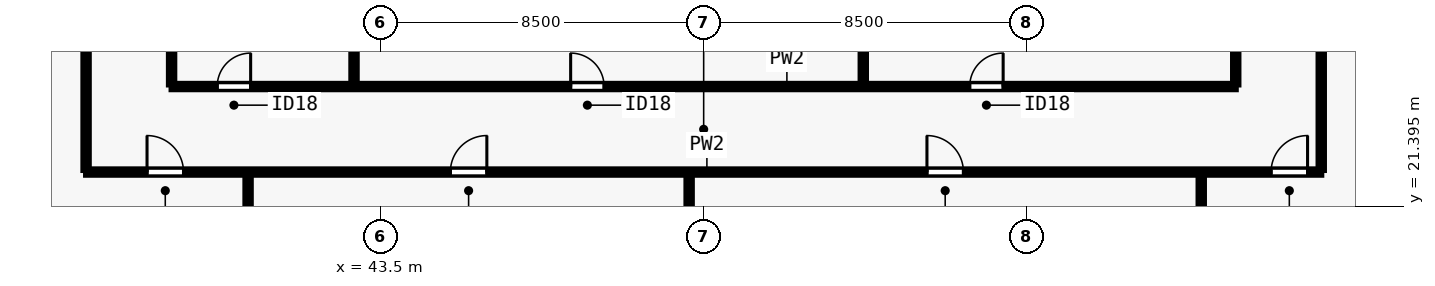
"""IFC4 building model, lengths in metres.
Left out: names, types, materials, properties, quantities, classifications, styles, units other than length and angle.
Written with IfcOpenShell. Run it as: python <this file> out.ifc"""

import sys

from ifc_helpers import new_model, si_unit, direction, frame, frame_2d, origin, place, context, subcontext, project, spatial, rectangle, extrude, element, fill, save


model = new_model("IFC4")
c1 = context("Model", 3, precision=1e-05, world=origin(), true_north=direction((0.0, 1.0)))
c2 = subcontext(c1, "Body", "Model", "MODEL_VIEW")
j1 = project(units=[si_unit("LENGTHUNIT", "METRE"), si_unit("PLANEANGLEUNIT", "RADIAN")], contexts=[c1])
p1 = place(None, origin())
s1 = spatial("IfcSite", under=j1, at=p1, CompositionType="ELEMENT")
p2 = place(p1, origin())
s2 = spatial("IfcBuilding", under=s1, at=p2, CompositionType="ELEMENT")
p3 = place(p2, frame((0.0, 0.0, 34.0)))
s3 = spatial("IfcBuildingStorey", under=s2, at=p3, CompositionType="ELEMENT", Elevation=34.0)
p4 = place(p3, frame((35.75, 22.3, 0.0), z_axis=(0.0, 0.0, 1.0), x_axis=(1.0, 0.0, 0.0)))
e1 = element("IfcWall", 1, at=p4, inside=s3, PredefinedType="PARTITIONING", context=c2, shape_type="SweptSolid", body=[
    extrude(rectangle(XDim=32.5, YDim=0.14, at=frame_2d((16.25, 0.0))), origin(), (0.0, 0.0, 1.0), 3.28),
])
p5 = place(p4, frame((1.604, 0.0, 0.0)))
e2 = element("IfcOpeningElement", 2, at=p5, cuts=e1, PredefinedType="OPENING", context=c2, shape_type="SweptSolid", body=[
    extrude(rectangle(XDim=0.96, YDim=2.12, at=frame_2d((0.48, 1.06))), frame((0.0, 0.08, 0.0), z_axis=(0.0, -1.0, 0.0), x_axis=(1.0, 0.0, 0.0)), (0.0, 0.0, 1.0), 0.16),
])
p6 = place(p4, frame((9.585, 0.0, 0.0)))
e3 = element("IfcOpeningElement", 3, at=p6, cuts=e1, PredefinedType="OPENING", context=c2, shape_type="SweptSolid", body=[
    extrude(rectangle(XDim=0.96, YDim=2.12, at=frame_2d((0.48, 1.06))), frame((0.0, 0.08, 0.0), z_axis=(0.0, -1.0, 0.0), x_axis=(1.0, 0.0, 0.0)), (0.0, 0.0, 1.0), 0.16),
])
p7 = place(p4, frame((22.125, 0.0, 0.0)))
e4 = element("IfcOpeningElement", 4, at=p7, cuts=e1, PredefinedType="OPENING", context=c2, shape_type="SweptSolid", body=[
    extrude(rectangle(XDim=0.96, YDim=2.12, at=frame_2d((0.48, 1.06))), frame((0.0, 0.08, 0.0), z_axis=(0.0, -1.0, 0.0), x_axis=(1.0, 0.0, 0.0)), (0.0, 0.0, 1.0), 0.16),
])
p8 = place(p4, frame((31.18, 0.0, 0.0)))
e5 = element("IfcOpeningElement", 5, at=p8, cuts=e1, PredefinedType="OPENING", context=c2, shape_type="SweptSolid", body=[
    extrude(rectangle(XDim=0.96, YDim=2.12, at=frame_2d((0.48, 1.06))), frame((0.0, 0.08, 0.0), z_axis=(0.0, -1.0, 0.0), x_axis=(1.0, 0.0, 0.0)), (0.0, 0.0, 1.0), 0.16),
])
p9 = place(p3, frame((35.75, 22.355, 0.0), z_axis=(0.0, 0.0, 1.0), x_axis=(0.0, 1.0, 0.0)))
e6 = element("IfcWall", 6, at=p9, inside=s3, PredefinedType="PARTITIONING", context=c2, shape_type="SweptSolid", body=[
    extrude(rectangle(XDim=33.29, YDim=0.14, at=frame_2d((16.645, 0.0))), origin(), (0.0, 0.0, 1.0), 3.28),
])
p10 = place(p9, frame((8.058, 0.0, 0.0)))
e7 = element("IfcOpeningElement", 7, at=p10, cuts=e6, PredefinedType="OPENING", context=c2, shape_type="SweptSolid", body=[
    extrude(rectangle(XDim=0.96, YDim=2.12, at=frame_2d((0.48, 1.06))), frame((0.0, 0.08, 0.0), z_axis=(0.0, -1.0, 0.0), x_axis=(1.0, 0.0, 0.0)), (0.0, 0.0, 1.0), 0.16),
])
p11 = place(p9, frame((24.658, 0.0, 0.0)))
e8 = element("IfcOpeningElement", 8, at=p11, cuts=e6, PredefinedType="OPENING", context=c2, shape_type="SweptSolid", body=[
    extrude(rectangle(XDim=0.96, YDim=2.12, at=frame_2d((0.48, 1.06))), frame((0.0, 0.08, 0.0), z_axis=(0.0, -1.0, 0.0), x_axis=(1.0, 0.0, 0.0)), (0.0, 0.0, 1.0), 0.16),
])
p12 = place(p3, frame((68.25, 22.355, 0.0), z_axis=(0.0, 0.0, 1.0), x_axis=(0.0, 1.0, 0.0)))
e9 = element("IfcWall", 9, at=p12, inside=s3, PredefinedType="PARTITIONING", context=c2, shape_type="SweptSolid", body=[
    extrude(rectangle(XDim=33.29, YDim=0.14, at=frame_2d((16.645, 0.0))), origin(), (0.0, 0.0, 1.0), 3.28),
])
p13 = place(p12, frame((3.522, 0.0, 0.0)))
e10 = element("IfcOpeningElement", 10, at=p13, cuts=e9, PredefinedType="OPENING", context=c2, shape_type="SweptSolid", body=[
    extrude(rectangle(XDim=0.96, YDim=2.12, at=frame_2d((0.48, 1.06))), frame((0.0, 0.08, 0.0), z_axis=(0.0, -1.0, 0.0), x_axis=(1.0, 0.0, 0.0)), (0.0, 0.0, 1.0), 0.16),
])
p14 = place(p12, frame((11.956, 0.0, 0.0)))
e11 = element("IfcOpeningElement", 11, at=p14, cuts=e9, PredefinedType="OPENING", context=c2, shape_type="SweptSolid", body=[
    extrude(rectangle(XDim=0.96, YDim=2.12, at=frame_2d((0.48, 1.06))), frame((0.0, 0.08, 0.0), z_axis=(0.0, -1.0, 0.0), x_axis=(1.0, 0.0, 0.0)), (0.0, 0.0, 1.0), 0.16),
])
p15 = place(p12, frame((20.256, 0.0, 0.0)))
e12 = element("IfcOpeningElement", 12, at=p15, cuts=e9, PredefinedType="OPENING", context=c2, shape_type="SweptSolid", body=[
    extrude(rectangle(XDim=0.96, YDim=2.12, at=frame_2d((0.48, 1.06))), frame((0.0, 0.08, 0.0), z_axis=(0.0, -1.0, 0.0), x_axis=(1.0, 0.0, 0.0)), (0.0, 0.0, 1.0), 0.16),
])
p16 = place(p12, frame((28.422, 0.0, 0.0)))
e13 = element("IfcOpeningElement", 13, at=p16, cuts=e9, PredefinedType="OPENING", context=c2, shape_type="SweptSolid", body=[
    extrude(rectangle(XDim=0.96, YDim=2.12, at=frame_2d((0.48, 1.06))), frame((0.0, 0.08, 0.0), z_axis=(0.0, -1.0, 0.0), x_axis=(1.0, 0.0, 0.0)), (0.0, 0.0, 1.0), 0.16),
])
p17 = place(p3, frame((38.0, 24.55, 0.0), z_axis=(0.0, 0.0, 1.0), x_axis=(1.0, 0.0, 0.0)))
e14 = element("IfcWall", 14, at=p17, inside=s3, PredefinedType="PARTITIONING", context=c2, shape_type="SweptSolid", body=[
    extrude(rectangle(XDim=28.0, YDim=0.14, at=frame_2d((14.0, 0.0))), origin(), (0.0, 0.0, 1.0), 3.28),
])
p18 = place(p17, frame((1.2, 0.0, 0.0)))
e15 = element("IfcOpeningElement", 15, at=p18, cuts=e14, PredefinedType="OPENING", context=c2, shape_type="SweptSolid", body=[
    extrude(rectangle(XDim=0.88, YDim=2.1, at=frame_2d((0.44, 1.05))), frame((0.0, 0.08, 0.0), z_axis=(0.0, -1.0, 0.0), x_axis=(1.0, 0.0, 0.0)), (0.0, 0.0, 1.0), 0.16),
])
p19 = place(p17, frame((10.5, 0.0, 0.0)))
e16 = element("IfcOpeningElement", 16, at=p19, cuts=e14, PredefinedType="OPENING", context=c2, shape_type="SweptSolid", body=[
    extrude(rectangle(XDim=0.88, YDim=2.1, at=frame_2d((0.44, 1.05))), frame((0.0, 0.08, 0.0), z_axis=(0.0, -1.0, 0.0), x_axis=(1.0, 0.0, 0.0)), (0.0, 0.0, 1.0), 0.16),
])
p20 = place(p17, frame((21.0, 0.0, 0.0)))
e17 = element("IfcOpeningElement", 17, at=p20, cuts=e14, PredefinedType="OPENING", context=c2, shape_type="SweptSolid", body=[
    extrude(rectangle(XDim=0.88, YDim=2.1, at=frame_2d((0.44, 1.05))), frame((0.0, 0.08, 0.0), z_axis=(0.0, -1.0, 0.0), x_axis=(1.0, 0.0, 0.0)), (0.0, 0.0, 1.0), 0.16),
])
p21 = place(p3, frame((38.0, 24.605, 0.0), z_axis=(0.0, 0.0, 1.0), x_axis=(0.0, 1.0, 0.0)))
e18 = element("IfcWall", 18, at=p21, inside=s3, PredefinedType="PARTITIONING", context=c2, shape_type="SweptSolid", body=[
    extrude(rectangle(XDim=14.145, YDim=0.14, at=frame_2d((7.073, 0.0))), origin(), (0.0, 0.0, 1.0), 3.28),
])
p22 = place(p21, frame((1.045, 0.0, 0.0)))
e19 = element("IfcOpeningElement", 19, at=p22, cuts=e18, PredefinedType="OPENING", context=c2, shape_type="SweptSolid", body=[
    extrude(rectangle(XDim=0.88, YDim=2.1, at=frame_2d((0.44, 1.05))), frame((0.0, 0.08, 0.0), z_axis=(0.0, -1.0, 0.0), x_axis=(1.0, 0.0, 0.0)), (0.0, 0.0, 1.0), 0.16),
])
p23 = place(p21, frame((11.195, 0.0, 0.0)))
e20 = element("IfcOpeningElement", 20, at=p23, cuts=e18, PredefinedType="OPENING", context=c2, shape_type="SweptSolid", body=[
    extrude(rectangle(XDim=0.88, YDim=2.1, at=frame_2d((0.44, 1.05))), frame((0.0, 0.08, 0.0), z_axis=(0.0, -1.0, 0.0), x_axis=(1.0, 0.0, 0.0)), (0.0, 0.0, 1.0), 0.16),
])
p24 = place(p3, frame((66.0, 24.605, 0.0), z_axis=(0.0, 0.0, 1.0), x_axis=(0.0, 1.0, 0.0)))
e21 = element("IfcWall", 21, at=p24, inside=s3, PredefinedType="PARTITIONING", context=c2, shape_type="SweptSolid", body=[
    extrude(rectangle(XDim=14.145, YDim=0.14, at=frame_2d((7.073, 0.0))), origin(), (0.0, 0.0, 1.0), 3.28),
])
p25 = place(p24, frame((2.445, 0.0, 0.0)))
e22 = element("IfcOpeningElement", 22, at=p25, cuts=e21, PredefinedType="OPENING", context=c2, shape_type="SweptSolid", body=[
    extrude(rectangle(XDim=0.88, YDim=2.1, at=frame_2d((0.44, 1.05))), frame((0.0, 0.08, 0.0), z_axis=(0.0, -1.0, 0.0), x_axis=(1.0, 0.0, 0.0)), (0.0, 0.0, 1.0), 0.16),
])
p26 = place(p3, frame((42.8, 24.605, 0.0), z_axis=(0.0, 0.0, 1.0), x_axis=(0.0, 1.0, 0.0)))
e23 = element("IfcWall", 23, at=p26, inside=s3, PredefinedType="PARTITIONING", context=c2, shape_type="SweptSolid", body=[
    extrude(rectangle(XDim=5.895, YDim=0.14, at=frame_2d((2.948, 0.0))), origin(), (0.0, 0.0, 1.0), 2.439),
])
p27 = place(p3, frame((56.2, 24.605, 0.0), z_axis=(0.0, 0.0, 1.0), x_axis=(0.0, 1.0, 0.0)))
e24 = element("IfcWall", 24, at=p27, inside=s3, PredefinedType="PARTITIONING", context=c2, shape_type="SweptSolid", body=[
    extrude(rectangle(XDim=5.635, YDim=0.14, at=frame_2d((2.817, 0.0))), origin(), (0.0, 0.0, 1.0), 2.849),
])
p28 = place(p3, frame((40.012, 13.92, 0.0), z_axis=(0.0, 0.0, 1.0), x_axis=(0.0, 1.0, 0.0)))
e25 = element("IfcWall", 25, at=p28, inside=s3, PredefinedType="PARTITIONING", context=c2, shape_type="SweptSolid", body=[
    extrude(rectangle(XDim=8.28, YDim=0.14, at=frame_2d((4.14, 0.0))), origin(), (0.0, 0.0, 1.0), 3.28),
])
p29 = place(p3, frame((51.617, 13.92, 0.0), z_axis=(0.0, 0.0, 1.0), x_axis=(0.0, 1.0, 0.0)))
e26 = element("IfcWall", 26, at=p29, inside=s3, PredefinedType="PARTITIONING", context=c2, shape_type="SweptSolid", body=[
    extrude(rectangle(XDim=8.28, YDim=0.14, at=frame_2d((4.14, 0.0))), origin(), (0.0, 0.0, 1.0), 2.849),
])
p30 = place(p3, frame((65.093, 13.92, 0.0), z_axis=(0.0, 0.0, 1.0), x_axis=(0.0, 1.0, 0.0)))
e27 = element("IfcWall", 27, at=p30, inside=s3, PredefinedType="PARTITIONING", context=c2, shape_type="SweptSolid", body=[
    extrude(rectangle(XDim=8.28, YDim=0.14, at=frame_2d((4.14, 0.0))), origin(), (0.0, 0.0, 1.0), 3.28),
])
p31 = place(p18, origin())
e28 = element("IfcDoor", 28, at=p31, inside=s3, OperationType="SINGLE_SWING_RIGHT", PredefinedType="DOOR", context=c2, shape_type="SweptSolid", body=[
    extrude(rectangle(XDim=0.88, YDim=2.1, at=frame_2d((0.44, 1.05))), frame((0.0, 0.025, 0.0), z_axis=(0.0, -1.0, 0.0), x_axis=(1.0, 0.0, 0.0)), (0.0, 0.0, 1.0), 0.05),
])
fill(e15, e28)
p32 = place(p19, origin())
e29 = element("IfcDoor", 29, at=p32, inside=s3, OperationType="SINGLE_SWING_LEFT", PredefinedType="DOOR", context=c2, shape_type="SweptSolid", body=[
    extrude(rectangle(XDim=0.88, YDim=2.1, at=frame_2d((0.44, 1.05))), frame((0.0, 0.025, 0.0), z_axis=(0.0, -1.0, 0.0), x_axis=(1.0, 0.0, 0.0)), (0.0, 0.0, 1.0), 0.05),
])
fill(e16, e29)
p33 = place(p20, origin())
e30 = element("IfcDoor", 30, at=p33, inside=s3, OperationType="SINGLE_SWING_RIGHT", PredefinedType="DOOR", context=c2, shape_type="SweptSolid", body=[
    extrude(rectangle(XDim=0.88, YDim=2.1, at=frame_2d((0.44, 1.05))), frame((0.0, 0.025, 0.0), z_axis=(0.0, -1.0, 0.0), x_axis=(1.0, 0.0, 0.0)), (0.0, 0.0, 1.0), 0.05),
])
fill(e17, e30)
p34 = place(p5, origin())
e31 = element("IfcDoor", 31, at=p34, inside=s3, OperationType="SINGLE_SWING_LEFT", PredefinedType="DOOR", context=c2, shape_type="SweptSolid", body=[
    extrude(rectangle(XDim=0.96, YDim=2.12, at=frame_2d((0.48, 1.06))), frame((0.0, 0.025, 0.0), z_axis=(0.0, -1.0, 0.0), x_axis=(1.0, 0.0, 0.0)), (0.0, 0.0, 1.0), 0.05),
])
fill(e2, e31)
p35 = place(p6, origin())
e32 = element("IfcDoor", 32, at=p35, inside=s3, OperationType="SINGLE_SWING_RIGHT", PredefinedType="DOOR", context=c2, shape_type="SweptSolid", body=[
    extrude(rectangle(XDim=0.96, YDim=2.12, at=frame_2d((0.48, 1.06))), frame((0.0, 0.025, 0.0), z_axis=(0.0, -1.0, 0.0), x_axis=(1.0, 0.0, 0.0)), (0.0, 0.0, 1.0), 0.05),
])
fill(e3, e32)
p36 = place(p7, origin())
e33 = element("IfcDoor", 33, at=p36, inside=s3, OperationType="SINGLE_SWING_LEFT", PredefinedType="DOOR", context=c2, shape_type="SweptSolid", body=[
    extrude(rectangle(XDim=0.96, YDim=2.12, at=frame_2d((0.48, 1.06))), frame((0.0, 0.025, 0.0), z_axis=(0.0, -1.0, 0.0), x_axis=(1.0, 0.0, 0.0)), (0.0, 0.0, 1.0), 0.05),
])
fill(e4, e33)
p37 = place(p8, origin())
e34 = element("IfcDoor", 34, at=p37, inside=s3, OperationType="SINGLE_SWING_RIGHT", PredefinedType="DOOR", context=c2, shape_type="SweptSolid", body=[
    extrude(rectangle(XDim=0.96, YDim=2.12, at=frame_2d((0.48, 1.06))), frame((0.0, 0.025, 0.0), z_axis=(0.0, -1.0, 0.0), x_axis=(1.0, 0.0, 0.0)), (0.0, 0.0, 1.0), 0.05),
])
fill(e5, e34)
save(model, sys.argv[1])
